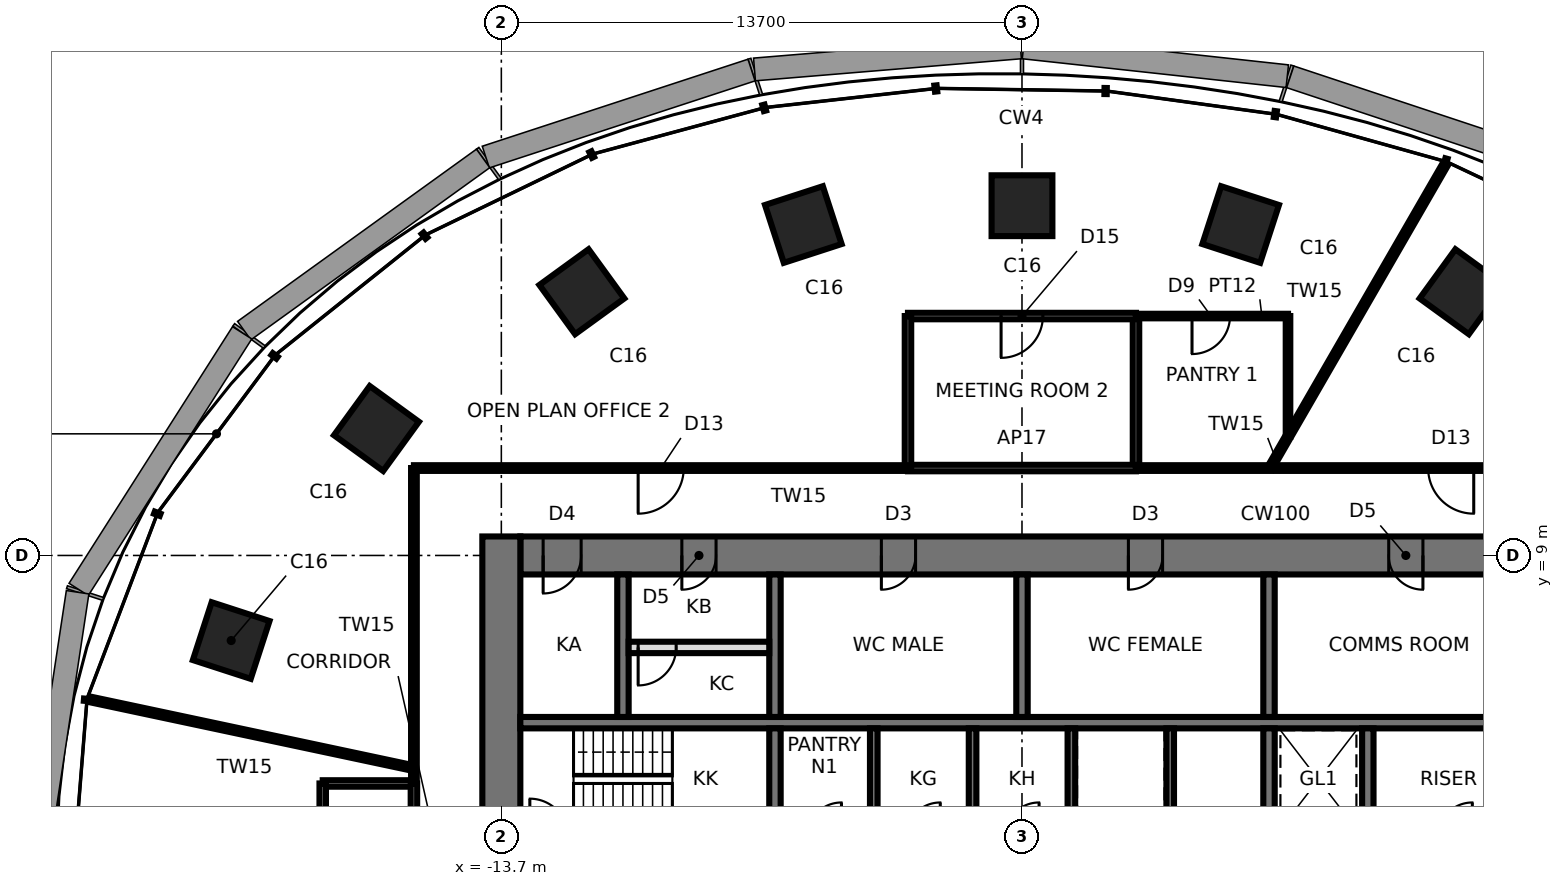
"""IFC4 building model, lengths in metres.
Left out: names, types, materials, properties, quantities, classifications, styles, units other than length and angle.
Written with IfcOpenShell. Run it as: python <this file> out.ifc"""

import sys

from ifc_helpers import new_model, si_unit, direction, frame, frame_2d, origin, origin_2d, place, context, subcontext, project, spatial, rectangle, extrude, element, fill, save


model = new_model("IFC4")
c1 = context("Model", 3, precision=1e-05, world=origin(), true_north=direction((0.0, 1.0)))
c2 = subcontext(c1, "Body", "Model", "MODEL_VIEW")
j1 = project(units=[si_unit("LENGTHUNIT", "METRE"), si_unit("PLANEANGLEUNIT", "RADIAN")], contexts=[c1])
p1 = place(None, origin())
s1 = spatial("IfcSite", under=j1, at=p1, CompositionType="ELEMENT")
p2 = place(p1, origin())
s2 = spatial("IfcBuilding", under=s1, at=p2, CompositionType="ELEMENT")
p3 = place(p2, frame((0.0, 0.0, 115.8)))
s3 = spatial("IfcBuildingStorey", under=s2, at=p3, CompositionType="ELEMENT", Elevation=115.8)
for number, where, z_axis, x_axis in (
    (1, (11.581, 15.94, 0.0), (0.0, 0.0, 1.0), (0.588, 0.809, 0.0)),
    (2, (5.754, 17.708, 0.0), (0.0, 0.0, 1.0), (0.309, 0.951, 0.0)),
    (3, (0.0, 18.204, 0.0), (0.0, 0.0, 1.0), (0.0, 1.0, 0.0)),
    (4, (-5.754, 17.708, 0.0), (0.0, 0.0, 1.0), (-0.309, 0.951, 0.0)),
    (5, (-11.581, 15.94, 0.0), (0.0, 0.0, 1.0), (-0.588, 0.809, 0.0)),
    (6, (-16.986, 12.341, 0.0), (0.0, 0.0, 1.0), (-0.809, 0.588, 0.0)),
    (7, (-20.808, 6.761, 0.0), (0.0, 0.0, 1.0), (-0.951, 0.309, 0.0)),
):
    element("IfcColumn", number, at=place(p3, frame(where, z_axis=z_axis, x_axis=x_axis)), inside=s3, PredefinedType="COLUMN", context=c2, shape_type="SweptSolid", body=[
        extrude(rectangle(XDim=1.6, YDim=1.6, at=origin_2d()), origin(), (0.0, 0.0, 1.0), 3.9),
    ])
p4 = place(p3, frame((13.2, 9.0, 0.0), z_axis=(0.0, 0.0, 1.0), x_axis=(-1.0, 0.0, 0.0)))
e8 = element("IfcWall", 8, at=p4, inside=s3, PredefinedType="SHEAR", context=c2, shape_type="SweptSolid", body=[
    extrude(rectangle(XDim=26.4, YDim=1.0, at=frame_2d((13.2, 0.0))), origin(), (0.0, 0.0, 1.0), 3.9),
])
p5 = place(p4, frame((2.65, 0.0, 0.0)))
e9 = element("IfcOpeningElement", 9, at=p5, cuts=e8, PredefinedType="OPENING", context=c2, shape_type="SweptSolid", body=[
    extrude(rectangle(XDim=0.9, YDim=2.1, at=frame_2d((0.45, 1.05))), frame((0.0, 0.51, 0.0), z_axis=(0.0, -1.0, 0.0), x_axis=(1.0, 0.0, 0.0)), (0.0, 0.0, 1.0), 1.02),
])
p6 = place(p4, frame((9.5, 0.0, 0.0)))
e10 = element("IfcOpeningElement", 10, at=p6, cuts=e8, PredefinedType="OPENING", context=c2, shape_type="SweptSolid", body=[
    extrude(rectangle(XDim=0.9, YDim=2.1, at=frame_2d((0.45, 1.05))), frame((0.0, 0.51, 0.0), z_axis=(0.0, -1.0, 0.0), x_axis=(1.0, 0.0, 0.0)), (0.0, 0.0, 1.0), 1.02),
])
p7 = place(p4, frame((16.0, 0.0, 0.0)))
e11 = element("IfcOpeningElement", 11, at=p7, cuts=e8, PredefinedType="OPENING", context=c2, shape_type="SweptSolid", body=[
    extrude(rectangle(XDim=0.9, YDim=2.1, at=frame_2d((0.45, 1.05))), frame((0.0, 0.51, 0.0), z_axis=(0.0, -1.0, 0.0), x_axis=(1.0, 0.0, 0.0)), (0.0, 0.0, 1.0), 1.02),
])
p8 = place(p4, frame((21.25, 0.0, 0.0)))
e12 = element("IfcOpeningElement", 12, at=p8, cuts=e8, PredefinedType="OPENING", context=c2, shape_type="SweptSolid", body=[
    extrude(rectangle(XDim=0.9, YDim=2.1, at=frame_2d((0.45, 1.05))), frame((0.0, 0.51, 0.0), z_axis=(0.0, -1.0, 0.0), x_axis=(1.0, 0.0, 0.0)), (0.0, 0.0, 1.0), 1.02),
])
p9 = place(p4, frame((24.8, 0.0, 0.0)))
e13 = element("IfcOpeningElement", 13, at=p9, cuts=e8, PredefinedType="OPENING", context=c2, shape_type="SweptSolid", body=[
    extrude(rectangle(XDim=1.0, YDim=2.1, at=frame_2d((0.5, 1.05))), frame((0.0, 0.51, 0.0), z_axis=(0.0, -1.0, 0.0), x_axis=(1.0, 0.0, 0.0)), (0.0, 0.0, 1.0), 1.02),
])
p10 = place(p3, frame((-13.7, 9.5, 0.0), z_axis=(0.0, 0.0, 1.0), x_axis=(0.0, -1.0, 0.0)))
e14 = element("IfcWall", 14, at=p10, inside=s3, PredefinedType="SHEAR", context=c2, shape_type="SweptSolid", body=[
    extrude(rectangle(XDim=19.0, YDim=1.0, at=frame_2d((9.5, 0.0))), origin(), (0.0, 0.0, 1.0), 3.9),
])
p11 = place(p10, frame((8.6, 0.0, 0.0)))
e15 = element("IfcOpeningElement", 15, at=p11, cuts=e14, PredefinedType="OPENING", context=c2, shape_type="SweptSolid", body=[
    extrude(rectangle(XDim=1.8, YDim=2.4, at=frame_2d((0.9, 1.2))), frame((0.0, 0.51, 0.0), z_axis=(0.0, -1.0, 0.0), x_axis=(1.0, 0.0, 0.0)), (0.0, 0.0, 1.0), 1.02),
])
p12 = place(p3, frame((-13.2, 4.6, 0.0), z_axis=(0.0, 0.0, 1.0), x_axis=(1.0, 0.0, 0.0)))
e16 = element("IfcWall", 16, at=p12, inside=s3, PredefinedType="SHEAR", context=c2, shape_type="SweptSolid", body=[
    extrude(rectangle(XDim=26.4, YDim=0.3, at=frame_2d((13.2, 0.0))), origin(), (0.0, 0.0, 1.0), 3.9),
])
p13 = place(p3, frame((-6.5, 1.75, 0.0), z_axis=(0.0, 0.0, 1.0), x_axis=(0.0, 1.0, 0.0)))
e17 = element("IfcWall", 17, at=p13, inside=s3, PredefinedType="SHEAR", context=c2, shape_type="SweptSolid", body=[
    extrude(rectangle(XDim=2.7, YDim=0.3, at=frame_2d((1.35, 0.0))), origin(), (0.0, 0.0, 1.0), 3.9),
])
p14 = place(p3, frame((-6.5, 4.75, 0.0), z_axis=(0.0, 0.0, 1.0), x_axis=(0.0, 1.0, 0.0)))
e18 = element("IfcWall", 18, at=p14, inside=s3, PredefinedType="SHEAR", context=c2, shape_type="SweptSolid", body=[
    extrude(rectangle(XDim=3.75, YDim=0.3, at=frame_2d((1.875, 0.0))), origin(), (0.0, 0.0, 1.0), 3.9),
])
p15 = place(p3, frame((6.5, 1.75, 0.0), z_axis=(0.0, 0.0, 1.0), x_axis=(0.0, 1.0, 0.0)))
e19 = element("IfcWall", 19, at=p15, inside=s3, PredefinedType="SHEAR", context=c2, shape_type="SweptSolid", body=[
    extrude(rectangle(XDim=2.7, YDim=0.3, at=frame_2d((1.35, 0.0))), origin(), (0.0, 0.0, 1.0), 3.9),
])
p16 = place(p3, frame((6.5, 4.75, 0.0), z_axis=(0.0, 0.0, 1.0), x_axis=(0.0, 1.0, 0.0)))
e20 = element("IfcWall", 20, at=p16, inside=s3, PredefinedType="SHEAR", context=c2, shape_type="SweptSolid", body=[
    extrude(rectangle(XDim=3.75, YDim=0.3, at=frame_2d((1.875, 0.0))), origin(), (0.0, 0.0, 1.0), 3.9),
])
for number, where, z_axis, x_axis in (
    (21, (-3.9, 1.75, 0.0), (0.0, 0.0, 1.0), (0.0, 1.0, 0.0)),
    (22, (-1.3, 1.75, 0.0), (0.0, 0.0, 1.0), (0.0, 1.0, 0.0)),
    (23, (1.3, 1.75, 0.0), (0.0, 0.0, 1.0), (0.0, 1.0, 0.0)),
    (24, (3.9, 1.75, 0.0), (0.0, 0.0, 1.0), (0.0, 1.0, 0.0)),
):
    element("IfcWall", number, at=place(p3, frame(where, z_axis=z_axis, x_axis=x_axis)), inside=s3, PredefinedType="SHEAR", context=c2, shape_type="SweptSolid", body=[
        extrude(rectangle(XDim=2.7, YDim=0.2, at=frame_2d((1.35, 0.0))), origin(), (0.0, 0.0, 1.0), 3.9),
    ])
for number, where, z_axis, x_axis in (
    (25, (0.0, 4.75, 0.0), (0.0, 0.0, 1.0), (0.0, 1.0, 0.0)),
    (26, (-10.5, 4.75, 0.0), (0.0, 0.0, 1.0), (0.0, 1.0, 0.0)),
):
    element("IfcWall", number, at=place(p3, frame(where, z_axis=z_axis, x_axis=x_axis)), inside=s3, PredefinedType="SHEAR", context=c2, shape_type="SweptSolid", body=[
        extrude(rectangle(XDim=3.75, YDim=0.3, at=frame_2d((1.875, 0.0))), origin(), (0.0, 0.0, 1.0), 3.9),
    ])
p17 = place(p3, frame((9.1, 1.75, 0.0), z_axis=(0.0, 0.0, 1.0), x_axis=(0.0, 1.0, 0.0)))
e27 = element("IfcWall", 27, at=p17, inside=s3, PredefinedType="SHEAR", context=c2, shape_type="SweptSolid", body=[
    extrude(rectangle(XDim=2.7, YDim=0.3, at=frame_2d((1.35, 0.0))), origin(), (0.0, 0.0, 1.0), 3.9),
])
p18 = place(p3, frame((-10.35, 6.58, 0.0), z_axis=(0.0, 0.0, 1.0), x_axis=(1.0, 0.0, 0.0)))
e28 = element("IfcWall", 28, at=p18, inside=s3, PredefinedType="PARTITIONING", context=c2, shape_type="SweptSolid", body=[
    extrude(rectangle(XDim=3.7, YDim=0.3, at=frame_2d((1.85, 0.0))), origin(), (0.0, 0.0, 1.0), 3.74),
])
p19 = place(p18, frame((0.25, 0.0, 0.0)))
e29 = element("IfcOpeningElement", 29, at=p19, cuts=e28, PredefinedType="OPENING", context=c2, shape_type="SweptSolid", body=[
    extrude(rectangle(XDim=1.0, YDim=2.4, at=frame_2d((0.5, 1.2))), frame((0.0, 0.16, 0.0), z_axis=(0.0, -1.0, 0.0), x_axis=(1.0, 0.0, 0.0)), (0.0, 0.0, 1.0), 0.32),
])
p20 = place(p3, frame((16.0, 11.3, 0.0), z_axis=(0.0, 0.0, 1.0), x_axis=(-1.0, 0.0, 0.0)))
e30 = element("IfcWall", 30, at=p20, inside=s3, PredefinedType="PARTITIONING", context=c2, shape_type="SweptSolid", body=[
    extrude(rectangle(XDim=13.0, YDim=0.15, at=frame_2d((6.5, 0.0))), origin(), (0.0, 0.0, 1.0), 3.74),
])
p21 = place(p20, frame((4.113, 0.0, 0.0)))
e31 = element("IfcOpeningElement", 31, at=p21, cuts=e30, PredefinedType="OPENING", context=c2, shape_type="SweptSolid", body=[
    extrude(rectangle(XDim=1.2, YDim=2.4, at=frame_2d((0.6, 1.2))), frame((0.0, 0.085, 0.0), z_axis=(0.0, -1.0, 0.0), x_axis=(1.0, 0.0, 0.0)), (0.0, 0.0, 1.0), 0.17),
])
p22 = place(p3, frame((6.524, 11.3, 0.0), z_axis=(0.0, 0.0, 1.0), x_axis=(0.499995827671, 0.866027812666, 0.0)))
e32 = element("IfcWall", 32, at=p22, inside=s3, PredefinedType="PARTITIONING", context=c2, shape_type="SweptSolid", body=[
    extrude(rectangle(XDim=9.225, YDim=0.15, at=frame_2d((4.613, 0.0))), origin(), (0.0, 0.0, 1.0), 3.74),
])
p23 = place(p3, frame((7.0, 12.124, 0.0), z_axis=(0.0, 0.0, 1.0), x_axis=(0.0, 1.0, 0.0)))
e33 = element("IfcWall", 33, at=p23, inside=s3, PredefinedType="PARTITIONING", context=c2, shape_type="SweptSolid", body=[
    extrude(rectangle(XDim=3.176, YDim=0.12, at=frame_2d((1.588, 0.0))), origin(), (0.0, 0.0, 1.0), 3.74),
])
p24 = place(p3, frame((7.0, 15.3, 0.0), z_axis=(0.0, 0.0, 1.0), x_axis=(-1.0, 0.0, 0.0)))
e34 = element("IfcWall", 34, at=p24, inside=s3, PredefinedType="PARTITIONING", context=c2, shape_type="SweptSolid", body=[
    extrude(rectangle(XDim=4.0, YDim=0.12, at=frame_2d((2.0, 0.0))), origin(), (0.0, 0.0, 1.0), 3.74),
])
p25 = place(p24, frame((1.526, 0.0, 0.0)))
e35 = element("IfcOpeningElement", 35, at=p25, cuts=e34, PredefinedType="OPENING", context=c2, shape_type="SweptSolid", body=[
    extrude(rectangle(XDim=1.0, YDim=2.4, at=frame_2d((0.5, 1.2))), frame((0.0, 0.07, 0.0), z_axis=(0.0, -1.0, 0.0), x_axis=(1.0, 0.0, 0.0)), (0.0, 0.0, 1.0), 0.14),
])
p26 = place(p3, frame((3.0, 15.3, 0.0), z_axis=(0.0, 0.0, 1.0), x_axis=(0.0, -1.0, 0.0)))
e36 = element("IfcWall", 36, at=p26, inside=s3, PredefinedType="PARTITIONING", context=c2, shape_type="SweptSolid", body=[
    extrude(rectangle(XDim=4.0, YDim=0.17, at=frame_2d((2.0, 0.0))), origin(), (0.0, 0.0, 1.0), 3.74),
])
p27 = place(p3, frame((-3.0, 11.3, 0.0), z_axis=(0.0, 0.0, 1.0), x_axis=(1.0, 0.0, 0.0)))
e37 = element("IfcWall", 37, at=p27, inside=s3, PredefinedType="PARTITIONING", context=c2, shape_type="SweptSolid", body=[
    extrude(rectangle(XDim=6.0, YDim=0.17, at=frame_2d((3.0, 0.0))), origin(), (0.0, 0.0, 1.0), 3.74),
])
p28 = place(p3, frame((3.0, 15.3, 0.0), z_axis=(0.0, 0.0, 1.0), x_axis=(-1.0, 0.0, 0.0)))
e38 = element("IfcWall", 38, at=p28, inside=s3, PredefinedType="PARTITIONING", context=c2, shape_type="SweptSolid", body=[
    extrude(rectangle(XDim=6.0, YDim=0.17, at=frame_2d((3.0, 0.0))), origin(), (0.0, 0.0, 1.0), 3.286),
])
p29 = place(p28, frame((2.45, 0.0, 0.0)))
e39 = element("IfcOpeningElement", 39, at=p29, cuts=e38, PredefinedType="OPENING", context=c2, shape_type="SweptSolid", body=[
    extrude(rectangle(XDim=1.1, YDim=2.4, at=frame_2d((0.55, 1.2))), frame((0.0, 0.095, 0.0), z_axis=(0.0, -1.0, 0.0), x_axis=(1.0, 0.0, 0.0)), (0.0, 0.0, 1.0), 0.19),
])
p30 = place(p3, frame((-3.0, 15.3, 0.0), z_axis=(0.0, 0.0, 1.0), x_axis=(0.0, -1.0, 0.0)))
e40 = element("IfcWall", 40, at=p30, inside=s3, PredefinedType="PARTITIONING", context=c2, shape_type="SweptSolid", body=[
    extrude(rectangle(XDim=4.0, YDim=0.17, at=frame_2d((2.0, 0.0))), origin(), (0.0, 0.0, 1.0), 3.74),
])
p31 = place(p3, frame((-3.0, 11.3, 0.0), z_axis=(0.0, 0.0, 1.0), x_axis=(-1.0, 0.0, 0.0)))
e41 = element("IfcWall", 41, at=p31, inside=s3, PredefinedType="PARTITIONING", context=c2, shape_type="SweptSolid", body=[
    extrude(rectangle(XDim=13.0, YDim=0.15, at=frame_2d((6.5, 0.0))), origin(), (0.0, 0.0, 1.0), 3.74),
])
p32 = place(p31, frame((5.9, 0.0, 0.0)))
e42 = element("IfcOpeningElement", 42, at=p32, cuts=e41, PredefinedType="OPENING", context=c2, shape_type="SweptSolid", body=[
    extrude(rectangle(XDim=1.2, YDim=2.4, at=frame_2d((0.6, 1.2))), frame((0.0, 0.085, 0.0), z_axis=(0.0, -1.0, 0.0), x_axis=(1.0, 0.0, 0.0)), (0.0, 0.0, 1.0), 0.17),
])
p33 = place(p3, frame((-16.0, 11.3, 0.0), z_axis=(0.0, 0.0, 1.0), x_axis=(0.0, -1.0, 0.0)))
e43 = element("IfcWall", 43, at=p33, inside=s3, PredefinedType="PARTITIONING", context=c2, shape_type="SweptSolid", body=[
    extrude(rectangle(XDim=8.3, YDim=0.15, at=frame_2d((4.15, 0.0))), origin(), (0.0, 0.0, 1.0), 3.74),
])
p34 = place(p3, frame((-16.0, 3.401, 0.0), z_axis=(0.0, 0.0, 1.0), x_axis=(-0.978149592602, 0.207902319596, 0.0)))
e44 = element("IfcWall", 44, at=p34, inside=s3, PredefinedType="PARTITIONING", context=c2, shape_type="SweptSolid", body=[
    extrude(rectangle(XDim=8.713, YDim=0.15, at=frame_2d((4.357, 0.0))), origin(), (0.0, 0.0, 1.0), 3.74),
])
p35 = place(p3, frame((-16.0, 3.0, 0.0), z_axis=(0.0, 0.0, 1.0), x_axis=(-1.0, 0.0, 0.0)))
e45 = element("IfcWall", 45, at=p35, inside=s3, PredefinedType="PARTITIONING", context=c2, shape_type="SweptSolid", body=[
    extrude(rectangle(XDim=2.4, YDim=0.17, at=frame_2d((1.2, 0.0))), origin(), (0.0, 0.0, 1.0), 3.74),
])
p36 = place(p3, frame((-16.0, -2.0, 0.0), z_axis=(0.0, 0.0, 1.0), x_axis=(0.0, 1.0, 0.0)))
e46 = element("IfcWall", 46, at=p36, inside=s3, PredefinedType="PARTITIONING", context=c2, shape_type="SweptSolid", body=[
    extrude(rectangle(XDim=5.0, YDim=0.17, at=frame_2d((2.5, 0.0))), origin(), (0.0, 0.0, 1.0), 3.74),
])
p37 = place(p3, frame((-18.4, 3.0, 0.0), z_axis=(0.0, 0.0, 1.0), x_axis=(0.0, -1.0, 0.0)))
e47 = element("IfcWall", 47, at=p37, inside=s3, PredefinedType="PARTITIONING", context=c2, shape_type="SweptSolid", body=[
    extrude(rectangle(XDim=5.0, YDim=0.17, at=frame_2d((2.5, 0.0))), origin(), (0.0, 0.0, 1.0), 3.74),
])
p38 = place(p37, frame((1.95, 0.0, 0.0)))
e48 = element("IfcOpeningElement", 48, at=p38, cuts=e47, PredefinedType="OPENING", context=c2, shape_type="SweptSolid", body=[
    extrude(rectangle(XDim=1.1, YDim=2.4, at=frame_2d((0.55, 1.2))), frame((0.0, 0.095, 0.0), z_axis=(0.0, -1.0, 0.0), x_axis=(1.0, 0.0, 0.0)), (0.0, 0.0, 1.0), 0.19),
])
p39 = place(p5, origin())
e49 = element("IfcDoor", 49, at=p39, inside=s3, OperationType="SINGLE_SWING_LEFT", PredefinedType="DOOR", context=c2, shape_type="SweptSolid", body=[
    extrude(rectangle(XDim=0.82, YDim=2.06, at=frame_2d((0.45, 1.03))), frame((0.0, 0.025, 0.0), z_axis=(0.0, -1.0, 0.0), x_axis=(1.0, 0.0, 0.0)), (0.0, 0.0, 1.0), 0.05),
    extrude(rectangle(XDim=0.04, YDim=2.1, at=frame_2d((0.02, 1.05))), frame((0.0, 0.25, 0.0), z_axis=(0.0, -1.0, 0.0), x_axis=(1.0, 0.0, 0.0)), (0.0, 0.0, 1.0), 0.5),
    extrude(rectangle(XDim=0.04, YDim=2.1, at=frame_2d((0.88, 1.05))), frame((0.0, 0.25, 0.0), z_axis=(0.0, -1.0, 0.0), x_axis=(1.0, 0.0, 0.0)), (0.0, 0.0, 1.0), 0.5),
    extrude(rectangle(XDim=0.82, YDim=0.04, at=frame_2d((0.45, 2.08))), frame((0.0, 0.25, 0.0), z_axis=(0.0, -1.0, 0.0), x_axis=(1.0, 0.0, 0.0)), (0.0, 0.0, 1.0), 0.5),
])
fill(e9, e49)
p40 = place(p6, origin())
e50 = element("IfcDoor", 50, at=p40, inside=s3, OperationType="SINGLE_SWING_RIGHT", PredefinedType="DOOR", context=c2, shape_type="SweptSolid", body=[
    extrude(rectangle(XDim=0.82, YDim=2.06, at=frame_2d((0.45, 1.03))), frame((0.0, 0.025, 0.0), z_axis=(0.0, -1.0, 0.0), x_axis=(1.0, 0.0, 0.0)), (0.0, 0.0, 1.0), 0.05),
    extrude(rectangle(XDim=0.04, YDim=2.1, at=frame_2d((0.02, 1.05))), frame((0.0, 0.25, 0.0), z_axis=(0.0, -1.0, 0.0), x_axis=(1.0, 0.0, 0.0)), (0.0, 0.0, 1.0), 0.5),
    extrude(rectangle(XDim=0.04, YDim=2.1, at=frame_2d((0.88, 1.05))), frame((0.0, 0.25, 0.0), z_axis=(0.0, -1.0, 0.0), x_axis=(1.0, 0.0, 0.0)), (0.0, 0.0, 1.0), 0.5),
    extrude(rectangle(XDim=0.82, YDim=0.04, at=frame_2d((0.45, 2.08))), frame((0.0, 0.25, 0.0), z_axis=(0.0, -1.0, 0.0), x_axis=(1.0, 0.0, 0.0)), (0.0, 0.0, 1.0), 0.5),
])
fill(e10, e50)
p41 = place(p7, origin())
e51 = element("IfcDoor", 51, at=p41, inside=s3, OperationType="SINGLE_SWING_RIGHT", PredefinedType="DOOR", context=c2, shape_type="SweptSolid", body=[
    extrude(rectangle(XDim=0.82, YDim=2.06, at=frame_2d((0.45, 1.03))), frame((0.0, 0.025, 0.0), z_axis=(0.0, -1.0, 0.0), x_axis=(1.0, 0.0, 0.0)), (0.0, 0.0, 1.0), 0.05),
    extrude(rectangle(XDim=0.04, YDim=2.1, at=frame_2d((0.02, 1.05))), frame((0.0, 0.25, 0.0), z_axis=(0.0, -1.0, 0.0), x_axis=(1.0, 0.0, 0.0)), (0.0, 0.0, 1.0), 0.5),
    extrude(rectangle(XDim=0.04, YDim=2.1, at=frame_2d((0.88, 1.05))), frame((0.0, 0.25, 0.0), z_axis=(0.0, -1.0, 0.0), x_axis=(1.0, 0.0, 0.0)), (0.0, 0.0, 1.0), 0.5),
    extrude(rectangle(XDim=0.82, YDim=0.04, at=frame_2d((0.45, 2.08))), frame((0.0, 0.25, 0.0), z_axis=(0.0, -1.0, 0.0), x_axis=(1.0, 0.0, 0.0)), (0.0, 0.0, 1.0), 0.5),
])
fill(e11, e51)
p42 = place(p8, origin())
e52 = element("IfcDoor", 52, at=p42, inside=s3, OperationType="SINGLE_SWING_RIGHT", PredefinedType="DOOR", context=c2, shape_type="SweptSolid", body=[
    extrude(rectangle(XDim=0.82, YDim=2.06, at=frame_2d((0.45, 1.03))), frame((0.0, 0.025, 0.0), z_axis=(0.0, -1.0, 0.0), x_axis=(1.0, 0.0, 0.0)), (0.0, 0.0, 1.0), 0.05),
    extrude(rectangle(XDim=0.04, YDim=2.1, at=frame_2d((0.02, 1.05))), frame((0.0, 0.25, 0.0), z_axis=(0.0, -1.0, 0.0), x_axis=(1.0, 0.0, 0.0)), (0.0, 0.0, 1.0), 0.5),
    extrude(rectangle(XDim=0.04, YDim=2.1, at=frame_2d((0.88, 1.05))), frame((0.0, 0.25, 0.0), z_axis=(0.0, -1.0, 0.0), x_axis=(1.0, 0.0, 0.0)), (0.0, 0.0, 1.0), 0.5),
    extrude(rectangle(XDim=0.82, YDim=0.04, at=frame_2d((0.45, 2.08))), frame((0.0, 0.25, 0.0), z_axis=(0.0, -1.0, 0.0), x_axis=(1.0, 0.0, 0.0)), (0.0, 0.0, 1.0), 0.5),
])
fill(e12, e52)
p43 = place(p9, origin())
e53 = element("IfcDoor", 53, at=p43, inside=s3, OperationType="SINGLE_SWING_RIGHT", PredefinedType="DOOR", context=c2, shape_type="SweptSolid", body=[
    extrude(rectangle(XDim=0.92, YDim=2.06, at=frame_2d((0.5, 1.03))), frame((0.0, 0.025, 0.0), z_axis=(0.0, -1.0, 0.0), x_axis=(1.0, 0.0, 0.0)), (0.0, 0.0, 1.0), 0.05),
    extrude(rectangle(XDim=0.04, YDim=2.1, at=frame_2d((0.02, 1.05))), frame((0.0, 0.25, 0.0), z_axis=(0.0, -1.0, 0.0), x_axis=(1.0, 0.0, 0.0)), (0.0, 0.0, 1.0), 0.5),
    extrude(rectangle(XDim=0.04, YDim=2.1, at=frame_2d((0.98, 1.05))), frame((0.0, 0.25, 0.0), z_axis=(0.0, -1.0, 0.0), x_axis=(1.0, 0.0, 0.0)), (0.0, 0.0, 1.0), 0.5),
    extrude(rectangle(XDim=0.92, YDim=0.04, at=frame_2d((0.5, 2.08))), frame((0.0, 0.25, 0.0), z_axis=(0.0, -1.0, 0.0), x_axis=(1.0, 0.0, 0.0)), (0.0, 0.0, 1.0), 0.5),
])
fill(e13, e53)
p44 = place(p19, frame((1.0, 0.0, 0.0), z_axis=(0.0, 0.0, 1.0), x_axis=(-1.0, 0.0, 0.0)))
e54 = element("IfcDoor", 54, at=p44, inside=s3, OperationType="SINGLE_SWING_RIGHT", PredefinedType="DOOR", context=c2, shape_type="SweptSolid", body=[
    extrude(rectangle(XDim=1.0, YDim=2.4, at=frame_2d((0.5, 1.2))), frame((0.0, 0.025, 0.0), z_axis=(0.0, -1.0, 0.0), x_axis=(1.0, 0.0, 0.0)), (0.0, 0.0, 1.0), 0.05),
])
fill(e29, e54)
p45 = place(p29, origin())
e55 = element("IfcDoor", 55, at=p45, inside=s3, OperationType="SINGLE_SWING_RIGHT", PredefinedType="DOOR", context=c2, shape_type="SweptSolid", body=[
    extrude(rectangle(XDim=1.1, YDim=2.4, at=frame_2d((0.55, 1.2))), frame((0.0, 0.025, 0.0), z_axis=(0.0, -1.0, 0.0), x_axis=(1.0, 0.0, 0.0)), (0.0, 0.0, 1.0), 0.05),
])
fill(e39, e55)
p46 = place(p25, origin())
e56 = element("IfcDoor", 56, at=p46, inside=s3, OperationType="SINGLE_SWING_RIGHT", PredefinedType="DOOR", context=c2, shape_type="SweptSolid", body=[
    extrude(rectangle(XDim=1.0, YDim=2.4, at=frame_2d((0.5, 1.2))), frame((0.0, 0.025, 0.0), z_axis=(0.0, -1.0, 0.0), x_axis=(1.0, 0.0, 0.0)), (0.0, 0.0, 1.0), 0.05),
])
fill(e35, e56)
p47 = place(p21, origin())
e57 = element("IfcDoor", 57, at=p47, inside=s3, OperationType="SINGLE_SWING_LEFT", PredefinedType="DOOR", context=c2, shape_type="SweptSolid", body=[
    extrude(rectangle(XDim=1.2, YDim=2.4, at=frame_2d((0.6, 1.2))), frame((0.0, 0.025, 0.0), z_axis=(0.0, -1.0, 0.0), x_axis=(1.0, 0.0, 0.0)), (0.0, 0.0, 1.0), 0.05),
])
fill(e31, e57)
p48 = place(p32, origin())
e58 = element("IfcDoor", 58, at=p48, inside=s3, OperationType="SINGLE_SWING_RIGHT", PredefinedType="DOOR", context=c2, shape_type="SweptSolid", body=[
    extrude(rectangle(XDim=1.2, YDim=2.4, at=frame_2d((0.6, 1.2))), frame((0.0, 0.025, 0.0), z_axis=(0.0, -1.0, 0.0), x_axis=(1.0, 0.0, 0.0)), (0.0, 0.0, 1.0), 0.05),
])
fill(e42, e58)
save(model, sys.argv[1])
